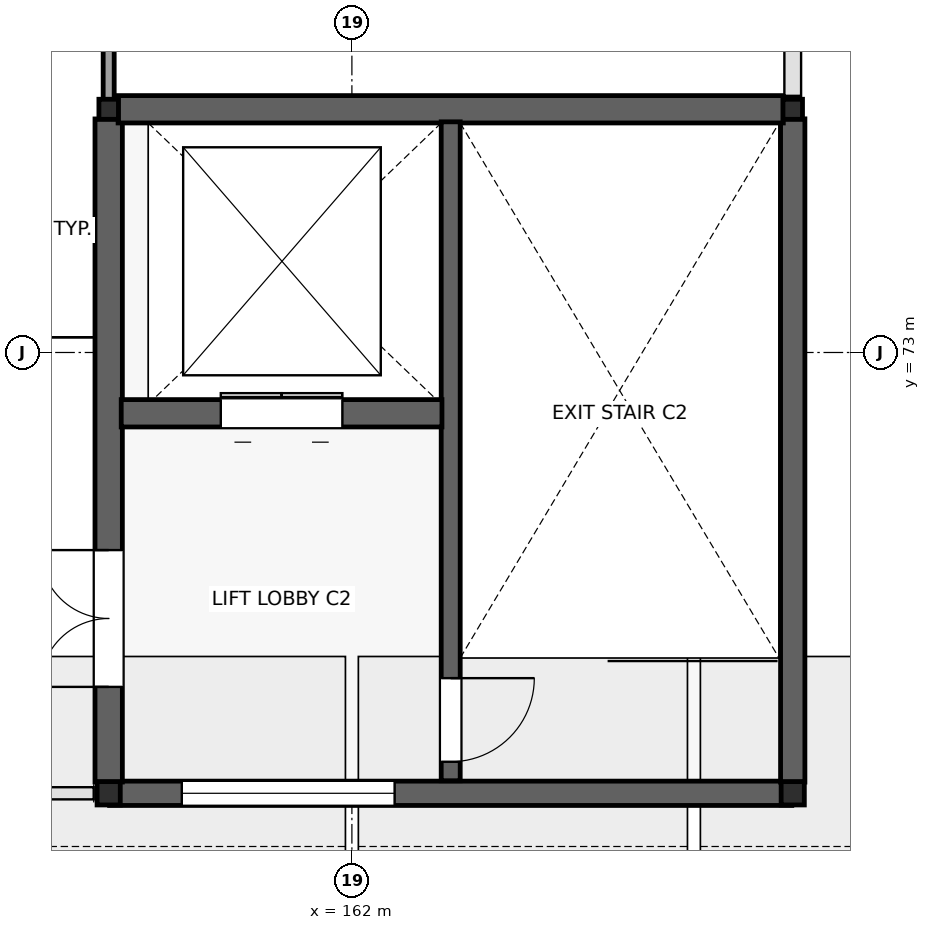
"""IFC4 building model, lengths in metres.
Left out: names, types, materials, properties, quantities, classifications, styles, units other than length and angle.
Written with IfcOpenShell. Run it as: python <this file> out.ifc"""

import sys

from ifc_helpers import new_model, si_unit, direction, frame, frame_2d, origin, origin_2d, place, context, subcontext, project, spatial, rectangle, i_section, extrude, element, fill, save


model = new_model("IFC4")
c1 = context("Model", 3, precision=1e-05, world=origin(), true_north=direction((0.0, 1.0)))
c2 = subcontext(c1, "Body", "Model", "MODEL_VIEW")
j1 = project(units=[si_unit("LENGTHUNIT", "METRE"), si_unit("PLANEANGLEUNIT", "RADIAN")], contexts=[c1])
p1 = place(None, origin())
s1 = spatial("IfcSite", under=j1, at=p1, CompositionType="ELEMENT")
p2 = place(p1, origin())
s2 = spatial("IfcBuilding", under=s1, at=p2, CompositionType="ELEMENT")
p3 = place(p2, frame((0.0, 0.0, 12.0)))
s3 = spatial("IfcBuildingStorey", under=s2, at=p3, CompositionType="ELEMENT", Elevation=12.0)
for number, where, z_axis, x_axis in (
    (1, (158.8, 67.2, 0.0), (0.0, 0.0, 1.0), (1.0, 0.0, 0.0)),
    (2, (167.8, 67.2, 0.0), (0.0, 0.0, 1.0), (1.0, 0.0, 0.0)),
):
    element("IfcColumn", number, at=place(p3, frame(where, z_axis=z_axis, x_axis=x_axis)), inside=s3, PredefinedType="COLUMN", context=c2, shape_type="SweptSolid", body=[
        extrude(i_section(OverallWidth=0.305, OverallDepth=0.307, WebThickness=0.01, FlangeThickness=0.015, at=origin_2d()), origin(), (0.0, 0.0, 1.0), 3.0),
    ])
for number, where, z_axis, x_axis in (
    (3, (158.8, 76.2, 0.0), (0.0, 0.0, 1.0), (1.0, 0.0, 0.0)),
    (4, (167.8, 76.2, 0.0), (0.0, 0.0, 1.0), (1.0, 0.0, 0.0)),
):
    element("IfcColumn", number, at=place(p3, frame(where, z_axis=z_axis, x_axis=x_axis)), inside=s3, PredefinedType="COLUMN", context=c2, shape_type="SweptSolid", body=[
        extrude(i_section(OverallWidth=0.257, OverallDepth=0.264, WebThickness=0.012, FlangeThickness=0.02, at=origin_2d()), origin(), (0.0, 0.0, 1.0), 3.0),
    ])
p4 = place(p3, frame((167.788, 67.2, 0.0), z_axis=(0.0, 0.0, 1.0), x_axis=(-1.0, 0.0, 0.0)))
e5 = element("IfcWall", 5, at=p4, inside=s3, PredefinedType="STANDARD", context=c2, shape_type="SweptSolid", body=[
    extrude(rectangle(XDim=8.976, YDim=0.32, at=frame_2d((4.488, 0.0))), origin(), (0.0, 0.0, 1.0), 3.0),
])
p5 = place(p4, frame((5.226, 0.0, 0.4)))
e6 = element("IfcOpeningElement", 6, at=p5, cuts=e5, PredefinedType="OPENING", context=c2, shape_type="SweptSolid", body=[
    extrude(rectangle(XDim=2.8, YDim=1.25, at=frame_2d((1.4, 0.625))), frame((0.0, 0.17, 0.0), z_axis=(0.0, -1.0, 0.0), x_axis=(1.0, 0.0, 0.0)), (0.0, 0.0, 1.0), 0.34),
])
p6 = place(p3, frame((167.8, 76.074, 0.0), z_axis=(0.0, 0.0, 1.0), x_axis=(0.0, -1.0, 0.0)))
e7 = element("IfcWall", 7, at=p6, inside=s3, PredefinedType="STANDARD", context=c2, shape_type="SweptSolid", body=[
    extrude(rectangle(XDim=8.727, YDim=0.32, at=frame_2d((4.364, 0.0))), origin(), (0.0, 0.0, 1.0), 3.0),
])
p7 = place(p3, frame((158.8, 67.348, 0.0), z_axis=(0.0, 0.0, 1.0), x_axis=(0.0, 1.0, 0.0)))
e8 = element("IfcWall", 8, at=p7, inside=s3, PredefinedType="SHEAR", context=c2, shape_type="SweptSolid", body=[
    extrude(rectangle(XDim=8.725, YDim=0.36, at=frame_2d((4.363, 0.0))), origin(), (0.0, 0.0, 1.0), 3.0),
])
p8 = place(p7, frame((1.252, 0.0, 0.0)))
e9 = element("IfcOpeningElement", 9, at=p8, cuts=e8, PredefinedType="OPENING", context=c2, shape_type="SweptSolid", body=[
    extrude(rectangle(XDim=1.8, YDim=2.3, at=frame_2d((0.9, 1.15))), frame((0.0, 0.19, 0.0), z_axis=(0.0, -1.0, 0.0), x_axis=(1.0, 0.0, 0.0)), (0.0, 0.0, 1.0), 0.38),
])
p9 = place(p3, frame((158.924, 76.2, 0.0), z_axis=(0.0, 0.0, 1.0), x_axis=(1.0, 0.0, 0.0)))
e10 = element("IfcWall", 10, at=p9, inside=s3, PredefinedType="SHEAR", context=c2, shape_type="SweptSolid", body=[
    extrude(rectangle(XDim=8.752, YDim=0.36, at=frame_2d((4.376, 0.0))), origin(), (0.0, 0.0, 1.0), 3.0),
])
p10 = place(p3, frame((163.3, 76.035, 0.0), z_axis=(0.0, 0.0, 1.0), x_axis=(0.0, -1.0, 0.0)))
e11 = element("IfcWall", 11, at=p10, inside=s3, PredefinedType="SHEAR", context=c2, shape_type="SweptSolid", body=[
    extrude(rectangle(XDim=8.67, YDim=0.25, at=frame_2d((4.335, 0.0))), origin(), (0.0, 0.0, 1.0), 3.0),
])
p11 = place(p10, frame((7.32, 0.0, 0.0)))
e12 = element("IfcOpeningElement", 12, at=p11, cuts=e11, PredefinedType="OPENING", context=c2, shape_type="SweptSolid", body=[
    extrude(rectangle(XDim=1.1, YDim=2.2, at=frame_2d((0.55, 1.1))), frame((0.0, 0.135, 0.0), z_axis=(0.0, -1.0, 0.0), x_axis=(1.0, 0.0, 0.0)), (0.0, 0.0, 1.0), 0.27),
])
p12 = place(p3, frame((158.965, 72.2, 0.0), z_axis=(0.0, 0.0, 1.0), x_axis=(1.0, 0.0, 0.0)))
e13 = element("IfcWall", 13, at=p12, inside=s3, PredefinedType="SHEAR", context=c2, shape_type="SweptSolid", body=[
    extrude(rectangle(XDim=4.22, YDim=0.36, at=frame_2d((2.11, 0.0))), origin(), (0.0, 0.0, 1.0), 3.0),
])
p13 = place(p12, frame((1.31, 0.0, 0.0)))
e14 = element("IfcOpeningElement", 14, at=p13, cuts=e13, PredefinedType="OPENING", context=c2, shape_type="SweptSolid", body=[
    extrude(rectangle(XDim=1.6, YDim=2.4, at=frame_2d((0.8, 1.2))), frame((0.0, 0.19, 0.0), z_axis=(0.0, -1.0, 0.0), x_axis=(1.0, 0.0, 0.0)), (0.0, 0.0, 1.0), 0.38),
])
p14 = place(p3, frame((158.8, 76.327, 0.0), z_axis=(0.0, 0.0, 1.0), x_axis=(0.0, 1.0, 0.0)))
e15 = element("IfcWall", 15, at=p14, inside=s3, PredefinedType="PARTITIONING", context=c2, shape_type="SweptSolid", body=[
    extrude(rectangle(XDim=8.546, YDim=0.145, at=frame_2d((4.273, 0.0))), origin(), (0.0, 0.0, 1.0), 2.95),
])
p15 = place(p5, origin())
e16 = element("IfcWindow", 16, at=p15, inside=s3, PartitioningType="SINGLE_PANEL", PredefinedType="WINDOW", context=c2, shape_type="SweptSolid", body=[
    extrude(rectangle(XDim=2.8, YDim=1.25, at=frame_2d((1.4, 0.625))), frame((0.0, 0.03, 0.0), z_axis=(0.0, -1.0, 0.0), x_axis=(1.0, 0.0, 0.0)), (0.0, 0.0, 1.0), 0.06),
])
fill(e6, e16)
p16 = place(p11, origin())
e17 = element("IfcDoor", 17, at=p16, inside=s3, OperationType="SINGLE_SWING_LEFT", PredefinedType="DOOR", context=c2, shape_type="SweptSolid", body=[
    extrude(rectangle(XDim=1.1, YDim=2.2, at=frame_2d((0.55, 1.1))), frame((0.0, 0.025, 0.0), z_axis=(0.0, -1.0, 0.0), x_axis=(1.0, 0.0, 0.0)), (0.0, 0.0, 1.0), 0.05),
])
fill(e12, e17)
p17 = place(p13, origin())
e18 = element("IfcDoor", 18, at=p17, inside=s3, OperationType="DOUBLE_DOOR_SLIDING", PredefinedType="DOOR", context=c2, shape_type="SweptSolid", body=[
    extrude(rectangle(XDim=1.6, YDim=2.4, at=frame_2d((0.8, 1.2))), frame((0.0, 0.025, 0.0), z_axis=(0.0, -1.0, 0.0), x_axis=(1.0, 0.0, 0.0)), (0.0, 0.0, 1.0), 0.05),
])
fill(e14, e18)
p18 = place(p8, origin())
e19 = element("IfcDoor", 19, at=p18, inside=s3, OperationType="DOUBLE_DOOR_SINGLE_SWING", PredefinedType="DOOR", context=c2, shape_type="SweptSolid", body=[
    extrude(rectangle(XDim=1.8, YDim=2.3, at=frame_2d((0.9, 1.15))), frame((0.0, 0.025, 0.0), z_axis=(0.0, -1.0, 0.0), x_axis=(1.0, 0.0, 0.0)), (0.0, 0.0, 1.0), 0.05),
])
fill(e9, e19)
save(model, sys.argv[1])
